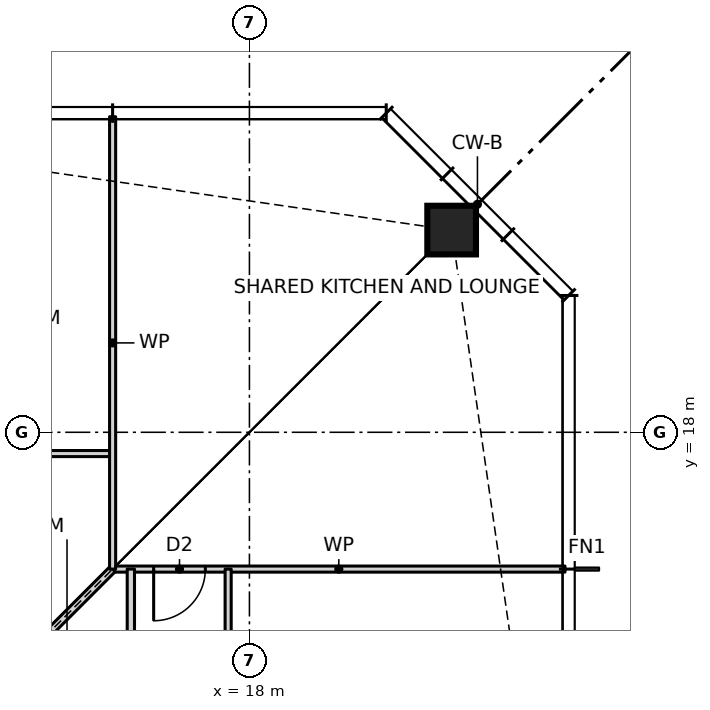
"""IFC4 building model, lengths in metres.
Left out: names, types, materials, properties, quantities, classifications, styles, units other than length and angle.
Written with IfcOpenShell. Run it as: python <this file> out.ifc"""

import sys

from ifc_helpers import new_model, si_unit, direction, frame, frame_2d, origin, origin_2d, place, context, subcontext, project, spatial, rectangle, hollow_rectangle, extrude, element, fill, save


model = new_model("IFC4")
c1 = context("Model", 3, precision=1e-05, world=origin(), true_north=direction((0.0, 1.0)))
c2 = subcontext(c1, "Body", "Model", "MODEL_VIEW")
j1 = project(units=[si_unit("LENGTHUNIT", "METRE"), si_unit("PLANEANGLEUNIT", "RADIAN")], contexts=[c1])
p1 = place(None, origin())
s1 = spatial("IfcSite", under=j1, at=p1, CompositionType="ELEMENT")
p2 = place(p1, origin())
s2 = spatial("IfcBuilding", under=s1, at=p2, CompositionType="ELEMENT")
p3 = place(p2, frame((0.0, 0.0, 18.5)))
s3 = spatial("IfcBuildingStorey", under=s2, at=p3, CompositionType="ELEMENT", Elevation=18.5)
p4 = place(p3, frame((21.326, 21.326, 0.0), z_axis=(0.0, 0.0, 1.0), x_axis=(1.0, 0.0, 0.0)))
e1 = element("IfcColumn", 1, at=p4, inside=s3, PredefinedType="COLUMN", context=c2, shape_type="SweptSolid", body=[
    extrude(hollow_rectangle(XDim=0.8, YDim=0.8, WallThickness=0.09, at=origin_2d()), origin(), (0.0, 0.0, 1.0), 3.5),
])
p5 = place(p3, frame((15.75, 15.75, 0.0), z_axis=(0.0, 0.0, 1.0), x_axis=(1.0, 0.0, 0.0)))
e2 = element("IfcWall", 2, at=p5, inside=s3, PredefinedType="PARTITIONING", context=c2, shape_type="SweptSolid", body=[
    extrude(rectangle(XDim=7.44, YDim=0.1, at=frame_2d((3.72, 0.0))), origin(), (0.0, 0.0, 1.0), 3.27),
])
p6 = place(p5, frame((0.675, 0.0, 0.0)))
e3 = element("IfcOpeningElement", 3, at=p6, cuts=e2, PredefinedType="OPENING", context=c2, shape_type="SweptSolid", body=[
    extrude(rectangle(XDim=0.85, YDim=2.1, at=frame_2d((0.425, 1.05))), frame((0.0, 0.06, 0.0), z_axis=(0.0, -1.0, 0.0), x_axis=(1.0, 0.0, 0.0)), (0.0, 0.0, 1.0), 0.12),
])
p7 = place(p3, frame((-15.75, 17.65, 0.0), z_axis=(0.0, 0.0, 1.0), x_axis=(1.0, 0.0, 0.0)))
e4 = element("IfcWall", 4, at=p7, inside=s3, PredefinedType="PARTITIONING", context=c2, shape_type="SweptSolid", body=[
    extrude(rectangle(XDim=31.5, YDim=0.1, at=frame_2d((15.75, 0.0))), origin(), (0.0, 0.0, 1.0), 3.27),
])
p8 = place(p7, frame((28.8, 0.0, 0.0)))
e5 = element("IfcOpeningElement", 5, at=p8, cuts=e4, PredefinedType="OPENING", context=c2, shape_type="SweptSolid", body=[
    extrude(rectangle(XDim=0.9, YDim=2.1, at=frame_2d((0.45, 1.05))), frame((0.0, 0.06, 0.0), z_axis=(0.0, -1.0, 0.0), x_axis=(1.0, 0.0, 0.0)), (0.0, 0.0, 1.0), 0.12),
])
p9 = place(p7, frame((24.3, 0.0, 0.0)))
e6 = element("IfcOpeningElement", 6, at=p9, cuts=e4, PredefinedType="OPENING", context=c2, shape_type="SweptSolid", body=[
    extrude(rectangle(XDim=0.9, YDim=2.1, at=frame_2d((0.45, 1.05))), frame((0.0, 0.06, 0.0), z_axis=(0.0, -1.0, 0.0), x_axis=(1.0, 0.0, 0.0)), (0.0, 0.0, 1.0), 0.12),
])
p10 = place(p7, frame((19.8, 0.0, 0.0)))
e7 = element("IfcOpeningElement", 7, at=p10, cuts=e4, PredefinedType="OPENING", context=c2, shape_type="SweptSolid", body=[
    extrude(rectangle(XDim=0.9, YDim=2.1, at=frame_2d((0.45, 1.05))), frame((0.0, 0.06, 0.0), z_axis=(0.0, -1.0, 0.0), x_axis=(1.0, 0.0, 0.0)), (0.0, 0.0, 1.0), 0.12),
])
p11 = place(p7, frame((15.3, 0.0, 0.0)))
e8 = element("IfcOpeningElement", 8, at=p11, cuts=e4, PredefinedType="OPENING", context=c2, shape_type="SweptSolid", body=[
    extrude(rectangle(XDim=0.9, YDim=2.1, at=frame_2d((0.45, 1.05))), frame((0.0, 0.06, 0.0), z_axis=(0.0, -1.0, 0.0), x_axis=(1.0, 0.0, 0.0)), (0.0, 0.0, 1.0), 0.12),
])
p12 = place(p7, frame((10.8, 0.0, 0.0)))
e9 = element("IfcOpeningElement", 9, at=p12, cuts=e4, PredefinedType="OPENING", context=c2, shape_type="SweptSolid", body=[
    extrude(rectangle(XDim=0.9, YDim=2.1, at=frame_2d((0.45, 1.05))), frame((0.0, 0.06, 0.0), z_axis=(0.0, -1.0, 0.0), x_axis=(1.0, 0.0, 0.0)), (0.0, 0.0, 1.0), 0.12),
])
p13 = place(p7, frame((6.3, 0.0, 0.0)))
e10 = element("IfcOpeningElement", 10, at=p13, cuts=e4, PredefinedType="OPENING", context=c2, shape_type="SweptSolid", body=[
    extrude(rectangle(XDim=0.9, YDim=2.1, at=frame_2d((0.45, 1.05))), frame((0.0, 0.06, 0.0), z_axis=(0.0, -1.0, 0.0), x_axis=(1.0, 0.0, 0.0)), (0.0, 0.0, 1.0), 0.12),
])
p14 = place(p7, frame((1.8, 0.0, 0.0)))
e11 = element("IfcOpeningElement", 11, at=p14, cuts=e4, PredefinedType="OPENING", context=c2, shape_type="SweptSolid", body=[
    extrude(rectangle(XDim=0.9, YDim=2.1, at=frame_2d((0.45, 1.05))), frame((0.0, 0.06, 0.0), z_axis=(0.0, -1.0, 0.0), x_axis=(1.0, 0.0, 0.0)), (0.0, 0.0, 1.0), 0.12),
])
p15 = place(p3, frame((11.6, 11.6, 0.0), z_axis=(0.0, 0.0, 1.0), x_axis=(0.707106781187, 0.707106781187, 0.0)))
e12 = element("IfcWall", 12, at=p15, inside=s3, PredefinedType="PARTITIONING", context=c2, shape_type="SweptSolid", body=[
    extrude(rectangle(XDim=5.869, YDim=0.12, at=frame_2d((2.935, 0.0))), origin(), (0.0, 0.0, 1.0), 2.343),
])
p16 = place(p3, frame((17.65, -15.75, 0.0), z_axis=(0.0, 0.0, 1.0), x_axis=(0.0, 1.0, 0.0)))
e13 = element("IfcWall", 13, at=p16, inside=s3, PredefinedType="PARTITIONING", context=c2, shape_type="SweptSolid", body=[
    extrude(rectangle(XDim=31.5, YDim=0.1, at=frame_2d((15.75, 0.0))), origin(), (0.0, 0.0, 1.0), 3.27),
])
p17 = place(p16, frame((1.8, 0.0, 0.0)))
e14 = element("IfcOpeningElement", 14, at=p17, cuts=e13, PredefinedType="OPENING", context=c2, shape_type="SweptSolid", body=[
    extrude(rectangle(XDim=0.9, YDim=2.1, at=frame_2d((0.45, 1.05))), frame((0.0, 0.06, 0.0), z_axis=(0.0, -1.0, 0.0), x_axis=(1.0, 0.0, 0.0)), (0.0, 0.0, 1.0), 0.12),
])
p18 = place(p16, frame((6.3, 0.0, 0.0)))
e15 = element("IfcOpeningElement", 15, at=p18, cuts=e13, PredefinedType="OPENING", context=c2, shape_type="SweptSolid", body=[
    extrude(rectangle(XDim=0.9, YDim=2.1, at=frame_2d((0.45, 1.05))), frame((0.0, 0.06, 0.0), z_axis=(0.0, -1.0, 0.0), x_axis=(1.0, 0.0, 0.0)), (0.0, 0.0, 1.0), 0.12),
])
p19 = place(p16, frame((10.8, 0.0, 0.0)))
e16 = element("IfcOpeningElement", 16, at=p19, cuts=e13, PredefinedType="OPENING", context=c2, shape_type="SweptSolid", body=[
    extrude(rectangle(XDim=0.9, YDim=2.1, at=frame_2d((0.45, 1.05))), frame((0.0, 0.06, 0.0), z_axis=(0.0, -1.0, 0.0), x_axis=(1.0, 0.0, 0.0)), (0.0, 0.0, 1.0), 0.12),
])
p20 = place(p16, frame((15.3, 0.0, 0.0)))
e17 = element("IfcOpeningElement", 17, at=p20, cuts=e13, PredefinedType="OPENING", context=c2, shape_type="SweptSolid", body=[
    extrude(rectangle(XDim=0.9, YDim=2.1, at=frame_2d((0.45, 1.05))), frame((0.0, 0.06, 0.0), z_axis=(0.0, -1.0, 0.0), x_axis=(1.0, 0.0, 0.0)), (0.0, 0.0, 1.0), 0.12),
])
p21 = place(p16, frame((19.8, 0.0, 0.0)))
e18 = element("IfcOpeningElement", 18, at=p21, cuts=e13, PredefinedType="OPENING", context=c2, shape_type="SweptSolid", body=[
    extrude(rectangle(XDim=0.9, YDim=2.1, at=frame_2d((0.45, 1.05))), frame((0.0, 0.06, 0.0), z_axis=(0.0, -1.0, 0.0), x_axis=(1.0, 0.0, 0.0)), (0.0, 0.0, 1.0), 0.12),
])
p22 = place(p16, frame((24.3, 0.0, 0.0)))
e19 = element("IfcOpeningElement", 19, at=p22, cuts=e13, PredefinedType="OPENING", context=c2, shape_type="SweptSolid", body=[
    extrude(rectangle(XDim=0.9, YDim=2.1, at=frame_2d((0.45, 1.05))), frame((0.0, 0.06, 0.0), z_axis=(0.0, -1.0, 0.0), x_axis=(1.0, 0.0, 0.0)), (0.0, 0.0, 1.0), 0.12),
])
p23 = place(p16, frame((28.8, 0.0, 0.0)))
e20 = element("IfcOpeningElement", 20, at=p23, cuts=e13, PredefinedType="OPENING", context=c2, shape_type="SweptSolid", body=[
    extrude(rectangle(XDim=0.9, YDim=2.1, at=frame_2d((0.45, 1.05))), frame((0.0, 0.06, 0.0), z_axis=(0.0, -1.0, 0.0), x_axis=(1.0, 0.0, 0.0)), (0.0, 0.0, 1.0), 0.12),
])
p24 = place(p3, frame((16.05, 10.65, 0.0), z_axis=(0.0, 0.0, 1.0), x_axis=(0.0, 1.0, 0.0)))
e21 = element("IfcWall", 21, at=p24, inside=s3, PredefinedType="PARTITIONING", context=c2, shape_type="SweptSolid", body=[
    extrude(rectangle(XDim=5.1, YDim=0.12, at=frame_2d((2.55, 0.0))), origin(), (0.0, 0.0, 1.0), 3.27),
])
p25 = place(p24, frame((2.875, 0.0, 0.0)))
e22 = element("IfcOpeningElement", 22, at=p25, cuts=e21, PredefinedType="OPENING", context=c2, shape_type="SweptSolid", body=[
    extrude(rectangle(XDim=0.85, YDim=2.1, at=frame_2d((0.425, 1.05))), frame((0.0, 0.07, 0.0), z_axis=(0.0, -1.0, 0.0), x_axis=(1.0, 0.0, 0.0)), (0.0, 0.0, 1.0), 0.14),
])
p26 = place(p3, frame((15.75, 15.75, 0.0), z_axis=(0.0, 0.0, 1.0), x_axis=(0.0, 1.0, 0.0)))
e23 = element("IfcWall", 23, at=p26, inside=s3, PredefinedType="PARTITIONING", context=c2, shape_type="SweptSolid", body=[
    extrude(rectangle(XDim=7.44, YDim=0.1, at=frame_2d((3.72, 0.0))), origin(), (0.0, 0.0, 1.0), 3.27),
])
p27 = place(p6, frame((0.85, 0.0, 0.0), z_axis=(0.0, 0.0, 1.0), x_axis=(-1.0, 0.0, 0.0)))
e24 = element("IfcDoor", 24, at=p27, inside=s3, OperationType="SINGLE_SWING_RIGHT", PredefinedType="DOOR", context=c2, shape_type="SweptSolid", body=[
    extrude(rectangle(XDim=0.85, YDim=2.1, at=frame_2d((0.425, 1.05))), frame((0.0, 0.025, 0.0), z_axis=(0.0, -1.0, 0.0), x_axis=(1.0, 0.0, 0.0)), (0.0, 0.0, 1.0), 0.05),
])
fill(e3, e24)
save(model, sys.argv[1])
